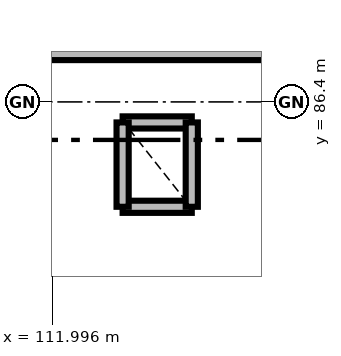
"""IFC4 building model, lengths in metres.
Left out: names, types, materials, properties, quantities, classifications, styles, units other than length and angle.
Written with IfcOpenShell. Run it as: python <this file> out.ifc"""

import sys

from ifc_helpers import new_model, si_unit, direction, frame, frame_2d, origin, place, context, subcontext, project, spatial, rectangle, extrude, element, save


model = new_model("IFC4")
c1 = context("Model", 3, precision=1e-05, world=origin(), true_north=direction((0.0, 1.0)))
c2 = subcontext(c1, "Body", "Model", "MODEL_VIEW")
j1 = project(units=[si_unit("LENGTHUNIT", "METRE"), si_unit("PLANEANGLEUNIT", "RADIAN")], contexts=[c1])
p1 = place(None, origin())
s1 = spatial("IfcSite", under=j1, at=p1, CompositionType="ELEMENT")
p2 = place(p1, origin())
s2 = spatial("IfcBuilding", under=s1, at=p2, CompositionType="ELEMENT")
p3 = place(p2, frame((0.0, 0.0, 9.3)))
s3 = spatial("IfcBuildingStorey", under=s2, at=p3, CompositionType="ELEMENT", Elevation=9.3)
p4 = place(p3, frame((112.92, 85.02, 0.0), z_axis=(0.0, 0.0, 1.0), x_axis=(1.0, 0.0, 0.0)))
e1 = element("IfcWall", 1, at=p4, inside=s3, PredefinedType="PARTITIONING", context=c2, shape_type="SweptSolid", body=[
    extrude(rectangle(XDim=0.91, YDim=0.16, at=frame_2d((0.455, 0.0))), origin(), (0.0, 0.0, 1.0), 3.65),
])
p5 = place(p3, frame((113.83, 86.13, 0.0), z_axis=(0.0, 0.0, 1.0), x_axis=(-1.0, 0.0, 0.0)))
e2 = element("IfcWall", 2, at=p5, inside=s3, PredefinedType="PARTITIONING", context=c2, shape_type="SweptSolid", body=[
    extrude(rectangle(XDim=0.91, YDim=0.16, at=frame_2d((0.455, 0.0))), origin(), (0.0, 0.0, 1.0), 3.175),
])
for number, where, z_axis, x_axis in (
    (3, (112.92, 86.13, 0.0), (0.0, 0.0, 1.0), (0.0, -1.0, 0.0)),
    (4, (113.83, 85.02, 0.0), (0.0, 0.0, 1.0), (0.0, 1.0, 0.0)),
):
    element("IfcWall", number, at=place(p3, frame(where, z_axis=z_axis, x_axis=x_axis)), inside=s3, PredefinedType="PARTITIONING", context=c2, shape_type="SweptSolid", body=[
        extrude(rectangle(XDim=1.11, YDim=0.16, at=frame_2d((0.555, 0.0))), origin(), (0.0, 0.0, 1.0), 3.175),
    ])
p6 = place(p3, frame((134.18, 87.05, 0.0), z_axis=(0.0, 0.0, 1.0), x_axis=(-1.0, 0.0, 0.0)))
e5 = element("IfcWall", 5, at=p6, inside=s3, PredefinedType="SOLIDWALL", context=c2, shape_type="SweptSolid", body=[
    extrude(rectangle(XDim=27.81, YDim=0.2, at=frame_2d((13.905, 0.0))), origin(), (0.0, 0.0, 1.0), 3.325),
])
save(model, sys.argv[1])
